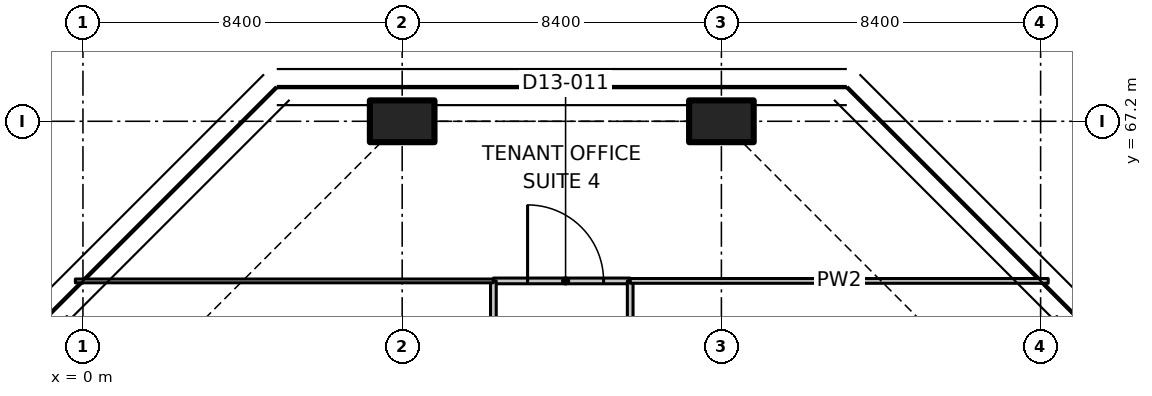
"""IFC4 building model, lengths in metres.
Left out: names, types, materials, properties, quantities, classifications, styles, units other than length and angle.
Written with IfcOpenShell. Run it as: python <this file> out.ifc"""

import sys

from ifc_helpers import new_model, si_unit, direction, frame, frame_2d, origin, origin_2d, place, context, subcontext, project, spatial, polyline, rectangle, outline, extrude, element, fill, save


model = new_model("IFC4")
c1 = context("Model", 3, precision=1e-05, world=origin(), true_north=direction((0.0, 1.0)))
c2 = subcontext(c1, "Body", "Model", "MODEL_VIEW")
j1 = project(units=[si_unit("LENGTHUNIT", "METRE"), si_unit("PLANEANGLEUNIT", "RADIAN")], contexts=[c1])
p1 = place(None, origin())
s1 = spatial("IfcSite", under=j1, at=p1, CompositionType="ELEMENT")
p2 = place(p1, origin())
s2 = spatial("IfcBuilding", under=s1, at=p2, CompositionType="ELEMENT")
p3 = place(p2, frame((0.0, 0.0, 91.7)))
s3 = spatial("IfcBuildingStorey", under=s2, at=p3, CompositionType="ELEMENT", Elevation=91.7)
for number, where, z_axis, x_axis in (
    (1, (8.4, 67.2, 0.0), (0.0, 0.0, 1.0), (0.0, 1.0, 0.0)),
    (2, (16.8, 67.2, 0.0), (0.0, 0.0, 1.0), (0.0, 1.0, 0.0)),
):
    element("IfcColumn", number, at=place(p3, frame(where, z_axis=z_axis, x_axis=x_axis)), inside=s3, PredefinedType="COLUMN", context=c2, shape_type="SweptSolid", body=[
        extrude(rectangle(XDim=1.1, YDim=1.7, at=origin_2d()), origin(), (0.0, 0.0, 1.0), 3.35),
    ])
p4 = place(p3, frame((10.8, 63.0, 0.0), z_axis=(0.0, 0.0, 1.0), x_axis=(1.0, 0.0, 0.0)))
e3 = element("IfcWall", 3, at=p4, inside=s3, PredefinedType="PARTITIONING", context=c2, shape_type="SweptSolid", body=[
    extrude(rectangle(XDim=3.6, YDim=0.15, at=frame_2d((1.8, 0.0))), origin(), (0.0, 0.0, 1.0), 3.33),
])
p5 = place(p4, frame((0.9, 0.0, 0.0)))
e4 = element("IfcOpeningElement", 4, at=p5, cuts=e3, PredefinedType="OPENING", context=c2, shape_type="SweptSolid", body=[
    extrude(rectangle(XDim=2.0, YDim=2.4, at=frame_2d((1.0, 1.2))), frame((0.0, 0.085, 0.0), z_axis=(0.0, -1.0, 0.0), x_axis=(1.0, 0.0, 0.0)), (0.0, 0.0, 1.0), 0.17),
])
p6 = place(p3, frame((10.8, 54.6, 0.0), z_axis=(0.0, 0.0, 1.0), x_axis=(0.0, 1.0, 0.0)))
e5 = element("IfcWall", 5, at=p6, inside=s3, PredefinedType="PARTITIONING", context=c2, shape_type="SweptSolid", body=[
    extrude(rectangle(XDim=8.4, YDim=0.15, at=frame_2d((4.2, 0.0))), origin(), (0.0, 0.0, 1.0), 3.33),
])
p7 = place(p6, frame((3.3, 0.0, 0.0)))
e6 = element("IfcOpeningElement", 6, at=p7, cuts=e5, PredefinedType="OPENING", context=c2, shape_type="SweptSolid", body=[
    extrude(rectangle(XDim=1.6, YDim=2.1, at=frame_2d((0.8, 1.05))), frame((0.0, 0.085, 0.0), z_axis=(0.0, -1.0, 0.0), x_axis=(1.0, 0.0, 0.0)), (0.0, 0.0, 1.0), 0.17),
])
p8 = place(p3, frame((14.4, 63.0, 0.0), z_axis=(0.0, 0.0, 1.0), x_axis=(0.0, -1.0, 0.0)))
e7 = element("IfcWall", 7, at=p8, inside=s3, PredefinedType="PARTITIONING", context=c2, shape_type="SweptSolid", body=[
    extrude(rectangle(XDim=8.4, YDim=0.15, at=frame_2d((4.2, 0.0))), origin(), (0.0, 0.0, 1.0), 3.33),
])
p9 = place(p8, frame((3.3, 0.0, 0.0)))
e8 = element("IfcOpeningElement", 8, at=p9, cuts=e7, PredefinedType="OPENING", context=c2, shape_type="SweptSolid", body=[
    extrude(rectangle(XDim=1.6, YDim=2.1, at=frame_2d((0.8, 1.05))), frame((0.0, 0.085, 0.0), z_axis=(0.0, -1.0, 0.0), x_axis=(1.0, 0.0, 0.0)), (0.0, 0.0, 1.0), 0.17),
])
p10 = place(p3, frame((10.8, 63.0, 0.0), z_axis=(0.0, 0.0, 1.0), x_axis=(-1.0, 0.0, 0.0)))
e9 = element("IfcWall", 9, at=p10, inside=s3, PredefinedType="PARTITIONING", context=c2, shape_type="SweptSolid", body=[
    extrude(outline(polyline([(0.0, 0.0), (11.0, 0.0), (11.0, 3.33), (7.266, 3.33), (7.264, 2.98), (5.936, 2.98), (5.934, 3.33), (0.0, 3.33), (0.0, 0.0)])), frame((0.0, 0.05, 0.0), z_axis=(0.0, -1.0, 0.0), x_axis=(1.0, 0.0, 0.0)), (0.0, 0.0, 1.0), 0.1),
])
p11 = place(p3, frame((25.4, 63.0, 0.0), z_axis=(0.0, 0.0, 1.0), x_axis=(-1.0, 0.0, 0.0)))
e10 = element("IfcWall", 10, at=p11, inside=s3, PredefinedType="PARTITIONING", context=c2, shape_type="SweptSolid", body=[
    extrude(outline(polyline([(0.0, 0.0), (11.0, 0.0), (11.0, 3.33), (5.078, 3.33), (5.076, 2.98), (3.724, 2.98), (3.722, 3.33), (0.0, 3.33), (0.0, 0.0)])), frame((0.0, 0.062, 0.0), z_axis=(0.0, -1.0, 0.0), x_axis=(1.0, 0.0, 0.0)), (0.0, 0.0, 1.0), 0.125),
])
p12 = place(p5, origin())
e11 = element("IfcDoor", 11, at=p12, inside=s3, OperationType="DOUBLE_DOOR_SINGLE_SWING", PredefinedType="DOOR", context=c2, shape_type="SweptSolid", body=[
    extrude(rectangle(XDim=2.0, YDim=2.4, at=frame_2d((1.0, 1.2))), frame((0.0, 0.025, 0.0), z_axis=(0.0, -1.0, 0.0), x_axis=(1.0, 0.0, 0.0)), (0.0, 0.0, 1.0), 0.05),
])
fill(e4, e11)
save(model, sys.argv[1])
